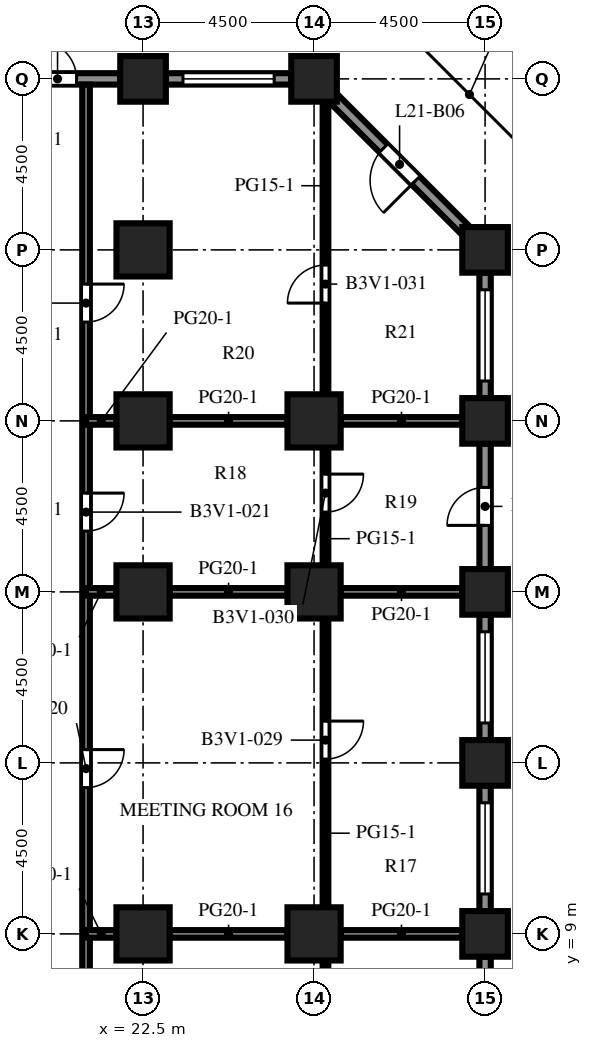
"""IFC4 building model, lengths in metres.
Left out: names, types, materials, properties, quantities, classifications, styles, units other than length and angle.
Written with IfcOpenShell. Run it as: python <this file> out.ifc"""

import sys

from ifc_helpers import new_model, si_unit, direction, frame, frame_2d, origin, origin_2d, place, context, subcontext, project, spatial, rectangle, extrude, element, fill, save


model = new_model("IFC4")
c1 = context("Model", 3, precision=1e-05, world=origin(), true_north=direction((0.0, 1.0)))
c2 = subcontext(c1, "Body", "Model", "MODEL_VIEW")
j1 = project(units=[si_unit("LENGTHUNIT", "METRE"), si_unit("PLANEANGLEUNIT", "RADIAN")], contexts=[c1])
p1 = place(None, origin())
s1 = spatial("IfcSite", under=j1, at=p1, CompositionType="ELEMENT")
p2 = place(p1, origin())
s2 = spatial("IfcBuilding", under=s1, at=p2, CompositionType="ELEMENT")
p3 = place(p2, frame((0.0, 0.0, 94.3)))
s3 = spatial("IfcBuildingStorey", under=s2, at=p3, CompositionType="ELEMENT", Elevation=94.3)
for number, where, z_axis, x_axis in (
    (1, (22.5, 31.5, 0.0), (0.0, 0.0, 1.0), (1.0, 0.0, 0.0)),
    (2, (27.0, 31.5, 0.0), (0.0, 0.0, 1.0), (1.0, 0.0, 0.0)),
    (3, (31.5, 9.0, 0.0), (0.0, 0.0, 1.0), (1.0, 0.0, 0.0)),
    (4, (31.5, 13.5, 0.0), (0.0, 0.0, 1.0), (1.0, 0.0, 0.0)),
    (5, (31.5, 18.0, 0.0), (0.0, 0.0, 1.0), (1.0, 0.0, 0.0)),
    (6, (31.5, 22.5, 0.0), (0.0, 0.0, 1.0), (1.0, 0.0, 0.0)),
    (7, (31.5, 27.0, 0.0), (0.0, 0.0, 1.0), (1.0, 0.0, 0.0)),
):
    element("IfcColumn", number, at=place(p3, frame(where, z_axis=z_axis, x_axis=x_axis)), inside=s3, PredefinedType="COLUMN", context=c2, shape_type="SweptSolid", body=[
        extrude(rectangle(XDim=1.2, YDim=1.2, at=origin_2d()), origin(), (0.0, 0.0, 1.0), 4.1),
    ])
for number, where, z_axis, x_axis in (
    (8, (22.5, 9.0, 0.0), (0.0, 0.0, 1.0), (1.0, 0.0, 0.0)),
    (9, (22.5, 18.0, 0.0), (0.0, 0.0, 1.0), (1.0, 0.0, 0.0)),
    (10, (22.5, 22.5, 0.0), (0.0, 0.0, 1.0), (1.0, 0.0, 0.0)),
    (11, (22.5, 27.0, 0.0), (0.0, 0.0, 1.0), (1.0, 0.0, 0.0)),
    (12, (27.0, 9.0, 0.0), (0.0, 0.0, 1.0), (1.0, 0.0, 0.0)),
    (13, (27.0, 18.0, 0.0), (0.0, 0.0, 1.0), (1.0, 0.0, 0.0)),
    (14, (27.0, 22.5, 0.0), (0.0, 0.0, 1.0), (1.0, 0.0, 0.0)),
):
    element("IfcColumn", number, at=place(p3, frame(where, z_axis=z_axis, x_axis=x_axis)), inside=s3, PredefinedType="COLUMN", context=c2, shape_type="SweptSolid", body=[
        extrude(rectangle(XDim=1.4, YDim=1.4, at=origin_2d()), origin(), (0.0, 0.0, 1.0), 4.1),
    ])
p4 = place(p3, frame((31.5, 8.4, 0.0), z_axis=(0.0, 0.0, 1.0), x_axis=(0.0, -1.0, 0.0)))
e15 = element("IfcWall", 15, at=p4, inside=s3, PredefinedType="SOLIDWALL", context=c2, shape_type="SweptSolid", body=[
    extrude(rectangle(XDim=3.3, YDim=0.3, at=frame_2d((1.65, 0.0))), origin(), (0.0, 0.0, 1.0), 2.75),
])
p5 = place(p4, frame((0.45, 0.0, 0.8)))
e16 = element("IfcOpeningElement", 16, at=p5, cuts=e15, PredefinedType="OPENING", context=c2, shape_type="SweptSolid", body=[
    extrude(rectangle(XDim=2.4, YDim=1.7, at=frame_2d((1.2, 0.85))), frame((0.0, 0.16, 0.0), z_axis=(0.0, -1.0, 0.0), x_axis=(1.0, 0.0, 0.0)), (0.0, 0.0, 1.0), 0.32),
])
p6 = place(p3, frame((31.5, 12.9, 0.0), z_axis=(0.0, 0.0, 1.0), x_axis=(0.0, -1.0, 0.0)))
e17 = element("IfcWall", 17, at=p6, inside=s3, PredefinedType="SOLIDWALL", context=c2, shape_type="SweptSolid", body=[
    extrude(rectangle(XDim=3.3, YDim=0.3, at=frame_2d((1.65, 0.0))), origin(), (0.0, 0.0, 1.0), 2.75),
])
p7 = place(p6, frame((0.45, 0.0, 0.8)))
e18 = element("IfcOpeningElement", 18, at=p7, cuts=e17, PredefinedType="OPENING", context=c2, shape_type="SweptSolid", body=[
    extrude(rectangle(XDim=2.4, YDim=1.7, at=frame_2d((1.2, 0.85))), frame((0.0, 0.16, 0.0), z_axis=(0.0, -1.0, 0.0), x_axis=(1.0, 0.0, 0.0)), (0.0, 0.0, 1.0), 0.32),
])
p8 = place(p3, frame((31.5, 17.4, 0.0), z_axis=(0.0, 0.0, 1.0), x_axis=(0.0, -1.0, 0.0)))
e19 = element("IfcWall", 19, at=p8, inside=s3, PredefinedType="SOLIDWALL", context=c2, shape_type="SweptSolid", body=[
    extrude(rectangle(XDim=3.3, YDim=0.3, at=frame_2d((1.65, 0.0))), origin(), (0.0, 0.0, 1.0), 2.75),
])
p9 = place(p8, frame((0.45, 0.0, 0.8)))
e20 = element("IfcOpeningElement", 20, at=p9, cuts=e19, PredefinedType="OPENING", context=c2, shape_type="SweptSolid", body=[
    extrude(rectangle(XDim=2.4, YDim=1.7, at=frame_2d((1.2, 0.85))), frame((0.0, 0.16, 0.0), z_axis=(0.0, -1.0, 0.0), x_axis=(1.0, 0.0, 0.0)), (0.0, 0.0, 1.0), 0.32),
])
p10 = place(p3, frame((31.5, 21.9, 0.0), z_axis=(0.0, 0.0, 1.0), x_axis=(0.0, -1.0, 0.0)))
e21 = element("IfcWall", 21, at=p10, inside=s3, PredefinedType="SOLIDWALL", context=c2, shape_type="SweptSolid", body=[
    extrude(rectangle(XDim=3.3, YDim=0.3, at=frame_2d((1.65, 0.0))), origin(), (0.0, 0.0, 1.0), 2.75),
])
p11 = place(p10, frame((1.15, 0.0, 0.0)))
e22 = element("IfcOpeningElement", 22, at=p11, cuts=e21, PredefinedType="OPENING", context=c2, shape_type="SweptSolid", body=[
    extrude(rectangle(XDim=1.0, YDim=2.2, at=frame_2d((0.5, 1.1))), frame((0.0, 0.16, 0.0), z_axis=(0.0, -1.0, 0.0), x_axis=(1.0, 0.0, 0.0)), (0.0, 0.0, 1.0), 0.32),
])
p12 = place(p3, frame((31.5, 26.4, 0.0), z_axis=(0.0, 0.0, 1.0), x_axis=(0.0, -1.0, 0.0)))
e23 = element("IfcWall", 23, at=p12, inside=s3, PredefinedType="SOLIDWALL", context=c2, shape_type="SweptSolid", body=[
    extrude(rectangle(XDim=3.3, YDim=0.3, at=frame_2d((1.65, 0.0))), origin(), (0.0, 0.0, 1.0), 2.75),
])
p13 = place(p12, frame((0.45, 0.0, 0.8)))
e24 = element("IfcOpeningElement", 24, at=p13, cuts=e23, PredefinedType="OPENING", context=c2, shape_type="SweptSolid", body=[
    extrude(rectangle(XDim=2.4, YDim=1.7, at=frame_2d((1.2, 0.85))), frame((0.0, 0.16, 0.0), z_axis=(0.0, -1.0, 0.0), x_axis=(1.0, 0.0, 0.0)), (0.0, 0.0, 1.0), 0.32),
])
p14 = place(p3, frame((27.494, 31.006, 0.0), z_axis=(0.0, 0.0, 1.0), x_axis=(0.707106781187, -0.707106781187, 0.0)))
e25 = element("IfcWall", 25, at=p14, inside=s3, PredefinedType="SOLIDWALL", context=c2, shape_type="SweptSolid", body=[
    extrude(rectangle(XDim=4.967, YDim=0.3, at=frame_2d((2.483, 0.0))), origin(), (0.0, 0.0, 1.0), 2.75),
])
p15 = place(p14, frame((1.884, 0.0, 0.0)))
e26 = element("IfcOpeningElement", 26, at=p15, cuts=e25, PredefinedType="OPENING", context=c2, shape_type="SweptSolid", body=[
    extrude(rectangle(XDim=1.2, YDim=2.2, at=frame_2d((0.6, 1.1))), frame((0.0, 0.16, 0.0), z_axis=(0.0, -1.0, 0.0), x_axis=(1.0, 0.0, 0.0)), (0.0, 0.0, 1.0), 0.32),
])
p16 = place(p3, frame((23.1, 31.5, 0.0), z_axis=(0.0, 0.0, 1.0), x_axis=(1.0, 0.0, 0.0)))
e27 = element("IfcWall", 27, at=p16, inside=s3, PredefinedType="SOLIDWALL", context=c2, shape_type="SweptSolid", body=[
    extrude(rectangle(XDim=3.3, YDim=0.3, at=frame_2d((1.65, 0.0))), origin(), (0.0, 0.0, 1.0), 2.75),
])
p17 = place(p16, frame((0.45, 0.0, 0.8)))
e28 = element("IfcOpeningElement", 28, at=p17, cuts=e27, PredefinedType="OPENING", context=c2, shape_type="SweptSolid", body=[
    extrude(rectangle(XDim=2.4, YDim=1.7, at=frame_2d((1.2, 0.85))), frame((0.0, 0.16, 0.0), z_axis=(0.0, -1.0, 0.0), x_axis=(1.0, 0.0, 0.0)), (0.0, 0.0, 1.0), 0.32),
])
p18 = place(p3, frame((18.6, 31.5, 0.0), z_axis=(0.0, 0.0, 1.0), x_axis=(1.0, 0.0, 0.0)))
e29 = element("IfcWall", 29, at=p18, inside=s3, PredefinedType="SOLIDWALL", context=c2, shape_type="SweptSolid", body=[
    extrude(rectangle(XDim=3.3, YDim=0.3, at=frame_2d((1.65, 0.0))), origin(), (0.0, 0.0, 1.0), 2.75),
])
p19 = place(p18, frame((1.15, 0.0, 0.0)))
e30 = element("IfcOpeningElement", 30, at=p19, cuts=e29, PredefinedType="OPENING", context=c2, shape_type="SweptSolid", body=[
    extrude(rectangle(XDim=1.0, YDim=2.2, at=frame_2d((0.5, 1.1))), frame((0.0, 0.16, 0.0), z_axis=(0.0, -1.0, 0.0), x_axis=(1.0, 0.0, 0.0)), (0.0, 0.0, 1.0), 0.32),
])
p20 = place(p3, frame((21.0, 31.35, 0.0), z_axis=(0.0, 0.0, 1.0), x_axis=(0.0, -1.0, 0.0)))
e31 = element("IfcWall", 31, at=p20, inside=s3, PredefinedType="PARTITIONING", context=c2, shape_type="SweptSolid", body=[
    extrude(rectangle(XDim=53.7, YDim=0.2, at=frame_2d((26.85, 0.0))), origin(), (0.0, 0.0, 1.0), 3.65),
])
p21 = place(p20, frame((47.5, 0.0, 0.0)))
e32 = element("IfcOpeningElement", 32, at=p21, cuts=e31, PredefinedType="OPENING", context=c2, shape_type="SweptSolid", body=[
    extrude(rectangle(XDim=1.0, YDim=2.1, at=frame_2d((0.5, 1.05))), frame((0.0, 0.11, 0.0), z_axis=(0.0, -1.0, 0.0), x_axis=(1.0, 0.0, 0.0)), (0.0, 0.0, 1.0), 0.22),
])
p22 = place(p20, frame((37.5, 0.0, 0.0)))
e33 = element("IfcOpeningElement", 33, at=p22, cuts=e31, PredefinedType="OPENING", context=c2, shape_type="SweptSolid", body=[
    extrude(rectangle(XDim=1.0, YDim=2.1, at=frame_2d((0.5, 1.05))), frame((0.0, 0.11, 0.0), z_axis=(0.0, -1.0, 0.0), x_axis=(1.0, 0.0, 0.0)), (0.0, 0.0, 1.0), 0.22),
])
p23 = place(p20, frame((27.25, 0.0, 0.0)))
e34 = element("IfcOpeningElement", 34, at=p23, cuts=e31, PredefinedType="OPENING", context=c2, shape_type="SweptSolid", body=[
    extrude(rectangle(XDim=1.0, YDim=2.1, at=frame_2d((0.5, 1.05))), frame((0.0, 0.11, 0.0), z_axis=(0.0, -1.0, 0.0), x_axis=(1.0, 0.0, 0.0)), (0.0, 0.0, 1.0), 0.22),
])
p24 = place(p20, frame((17.5, 0.0, 0.0)))
e35 = element("IfcOpeningElement", 35, at=p24, cuts=e31, PredefinedType="OPENING", context=c2, shape_type="SweptSolid", body=[
    extrude(rectangle(XDim=1.0, YDim=2.1, at=frame_2d((0.5, 1.05))), frame((0.0, 0.11, 0.0), z_axis=(0.0, -1.0, 0.0), x_axis=(1.0, 0.0, 0.0)), (0.0, 0.0, 1.0), 0.22),
])
p25 = place(p20, frame((10.75, 0.0, 0.0)))
e36 = element("IfcOpeningElement", 36, at=p25, cuts=e31, PredefinedType="OPENING", context=c2, shape_type="SweptSolid", body=[
    extrude(rectangle(XDim=1.0, YDim=2.1, at=frame_2d((0.5, 1.05))), frame((0.0, 0.11, 0.0), z_axis=(0.0, -1.0, 0.0), x_axis=(1.0, 0.0, 0.0)), (0.0, 0.0, 1.0), 0.22),
])
p26 = place(p20, frame((5.25, 0.0, 0.0)))
e37 = element("IfcOpeningElement", 37, at=p26, cuts=e31, PredefinedType="OPENING", context=c2, shape_type="SweptSolid", body=[
    extrude(rectangle(XDim=1.0, YDim=2.1, at=frame_2d((0.5, 1.05))), frame((0.0, 0.11, 0.0), z_axis=(0.0, -1.0, 0.0), x_axis=(1.0, 0.0, 0.0)), (0.0, 0.0, 1.0), 0.22),
])
p27 = place(p3, frame((27.3, 8.3, 0.0), z_axis=(0.0, 0.0, 1.0), x_axis=(0.0, -1.0, 0.0)))
e38 = element("IfcWall", 38, at=p27, inside=s3, PredefinedType="PARTITIONING", context=c2, shape_type="SweptSolid", body=[
    extrude(rectangle(XDim=7.6, YDim=0.15, at=frame_2d((3.8, 0.0))), origin(), (0.0, 0.0, 1.0), 3.65),
])
p28 = place(p27, frame((2.7, 0.0, 0.0)))
e39 = element("IfcOpeningElement", 39, at=p28, cuts=e38, PredefinedType="OPENING", context=c2, shape_type="SweptSolid", body=[
    extrude(rectangle(XDim=1.0, YDim=2.1, at=frame_2d((0.5, 1.05))), frame((0.0, 0.085, 0.0), z_axis=(0.0, -1.0, 0.0), x_axis=(1.0, 0.0, 0.0)), (0.0, 0.0, 1.0), 0.17),
])
p29 = place(p3, frame((27.3, 17.3, 0.0), z_axis=(0.0, 0.0, 1.0), x_axis=(0.0, -1.0, 0.0)))
e40 = element("IfcWall", 40, at=p29, inside=s3, PredefinedType="PARTITIONING", context=c2, shape_type="SweptSolid", body=[
    extrude(rectangle(XDim=7.6, YDim=0.15, at=frame_2d((3.8, 0.0))), origin(), (0.0, 0.0, 1.0), 3.65),
])
p30 = place(p29, frame((2.7, 0.0, 0.0)))
e41 = element("IfcOpeningElement", 41, at=p30, cuts=e40, PredefinedType="OPENING", context=c2, shape_type="SweptSolid", body=[
    extrude(rectangle(XDim=1.0, YDim=2.1, at=frame_2d((0.5, 1.05))), frame((0.0, 0.085, 0.0), z_axis=(0.0, -1.0, 0.0), x_axis=(1.0, 0.0, 0.0)), (0.0, 0.0, 1.0), 0.17),
])
p31 = place(p3, frame((27.3, 21.8, 0.0), z_axis=(0.0, 0.0, 1.0), x_axis=(0.0, -1.0, 0.0)))
e42 = element("IfcWall", 42, at=p31, inside=s3, PredefinedType="PARTITIONING", context=c2, shape_type="SweptSolid", body=[
    extrude(rectangle(XDim=3.1, YDim=0.15, at=frame_2d((1.55, 0.0))), origin(), (0.0, 0.0, 1.0), 3.65),
])
p32 = place(p31, frame((0.7, 0.0, 0.0)))
e43 = element("IfcOpeningElement", 43, at=p32, cuts=e42, PredefinedType="OPENING", context=c2, shape_type="SweptSolid", body=[
    extrude(rectangle(XDim=1.0, YDim=2.1, at=frame_2d((0.5, 1.05))), frame((0.0, 0.085, 0.0), z_axis=(0.0, -1.0, 0.0), x_axis=(1.0, 0.0, 0.0)), (0.0, 0.0, 1.0), 0.17),
])
p33 = place(p3, frame((27.3, 30.777, 0.0), z_axis=(0.0, 0.0, 1.0), x_axis=(0.0, -1.0, 0.0)))
e44 = element("IfcWall", 44, at=p33, inside=s3, PredefinedType="PARTITIONING", context=c2, shape_type="SweptSolid", body=[
    extrude(rectangle(XDim=7.577, YDim=0.15, at=frame_2d((3.789, 0.0))), origin(), (0.0, 0.0, 1.0), 3.65),
])
p34 = place(p33, frame((4.177, 0.0, 0.0)))
e45 = element("IfcOpeningElement", 45, at=p34, cuts=e44, PredefinedType="OPENING", context=c2, shape_type="SweptSolid", body=[
    extrude(rectangle(XDim=1.0, YDim=2.1, at=frame_2d((0.5, 1.05))), frame((0.0, 0.085, 0.0), z_axis=(0.0, -1.0, 0.0), x_axis=(1.0, 0.0, 0.0)), (0.0, 0.0, 1.0), 0.17),
])
p35 = place(p3, frame((21.0, 9.0, 0.0), z_axis=(0.0, 0.0, 1.0), x_axis=(1.0, 0.0, 0.0)))
e46 = element("IfcWall", 46, at=p35, inside=s3, PredefinedType="PARTITIONING", context=c2, shape_type="SweptSolid", body=[
    extrude(rectangle(XDim=0.8, YDim=0.2, at=frame_2d((0.4, 0.0))), origin(), (0.0, 0.0, 1.0), 3.65),
])
p36 = place(p3, frame((23.2, 9.0, 0.0), z_axis=(0.0, 0.0, 1.0), x_axis=(1.0, 0.0, 0.0)))
e47 = element("IfcWall", 47, at=p36, inside=s3, PredefinedType="PARTITIONING", context=c2, shape_type="SweptSolid", body=[
    extrude(rectangle(XDim=3.1, YDim=0.2, at=frame_2d((1.55, 0.0))), origin(), (0.0, 0.0, 1.0), 3.65),
])
p37 = place(p3, frame((27.7, 9.0, 0.0), z_axis=(0.0, 0.0, 1.0), x_axis=(1.0, 0.0, 0.0)))
e48 = element("IfcWall", 48, at=p37, inside=s3, PredefinedType="PARTITIONING", context=c2, shape_type="SweptSolid", body=[
    extrude(rectangle(XDim=3.2, YDim=0.2, at=frame_2d((1.6, 0.0))), origin(), (0.0, 0.0, 1.0), 3.65),
])
p38 = place(p3, frame((21.0, 18.0, 0.0), z_axis=(0.0, 0.0, 1.0), x_axis=(1.0, 0.0, 0.0)))
e49 = element("IfcWall", 49, at=p38, inside=s3, PredefinedType="PARTITIONING", context=c2, shape_type="SweptSolid", body=[
    extrude(rectangle(XDim=0.8, YDim=0.2, at=frame_2d((0.4, 0.0))), origin(), (0.0, 0.0, 1.0), 3.65),
])
p39 = place(p3, frame((23.2, 18.0, 0.0), z_axis=(0.0, 0.0, 1.0), x_axis=(1.0, 0.0, 0.0)))
e50 = element("IfcWall", 50, at=p39, inside=s3, PredefinedType="PARTITIONING", context=c2, shape_type="SweptSolid", body=[
    extrude(rectangle(XDim=3.1, YDim=0.2, at=frame_2d((1.55, 0.0))), origin(), (0.0, 0.0, 1.0), 3.65),
])
p40 = place(p3, frame((27.7, 18.0, 0.0), z_axis=(0.0, 0.0, 1.0), x_axis=(1.0, 0.0, 0.0)))
e51 = element("IfcWall", 51, at=p40, inside=s3, PredefinedType="PARTITIONING", context=c2, shape_type="SweptSolid", body=[
    extrude(rectangle(XDim=3.2, YDim=0.2, at=frame_2d((1.6, 0.0))), origin(), (0.0, 0.0, 1.0), 3.65),
])
p41 = place(p3, frame((21.0, 22.5, 0.0), z_axis=(0.0, 0.0, 1.0), x_axis=(1.0, 0.0, 0.0)))
e52 = element("IfcWall", 52, at=p41, inside=s3, PredefinedType="PARTITIONING", context=c2, shape_type="SweptSolid", body=[
    extrude(rectangle(XDim=0.8, YDim=0.2, at=frame_2d((0.4, 0.0))), origin(), (0.0, 0.0, 1.0), 3.65),
])
p42 = place(p3, frame((23.2, 22.5, 0.0), z_axis=(0.0, 0.0, 1.0), x_axis=(1.0, 0.0, 0.0)))
e53 = element("IfcWall", 53, at=p42, inside=s3, PredefinedType="PARTITIONING", context=c2, shape_type="SweptSolid", body=[
    extrude(rectangle(XDim=3.1, YDim=0.2, at=frame_2d((1.55, 0.0))), origin(), (0.0, 0.0, 1.0), 3.65),
])
p43 = place(p3, frame((27.7, 22.5, 0.0), z_axis=(0.0, 0.0, 1.0), x_axis=(1.0, 0.0, 0.0)))
e54 = element("IfcWall", 54, at=p43, inside=s3, PredefinedType="PARTITIONING", context=c2, shape_type="SweptSolid", body=[
    extrude(rectangle(XDim=3.2, YDim=0.2, at=frame_2d((1.6, 0.0))), origin(), (0.0, 0.0, 1.0), 3.65),
])
p44 = place(p7, origin())
e55 = element("IfcWindow", 55, at=p44, inside=s3, PartitioningType="SINGLE_PANEL", PredefinedType="WINDOW", context=c2, shape_type="SweptSolid", body=[
    extrude(rectangle(XDim=2.4, YDim=1.7, at=frame_2d((1.2, 0.85))), frame((0.0, 0.03, 0.0), z_axis=(0.0, -1.0, 0.0), x_axis=(1.0, 0.0, 0.0)), (0.0, 0.0, 1.0), 0.06),
])
fill(e18, e55)
p45 = place(p9, origin())
e56 = element("IfcWindow", 56, at=p45, inside=s3, PartitioningType="SINGLE_PANEL", PredefinedType="WINDOW", context=c2, shape_type="SweptSolid", body=[
    extrude(rectangle(XDim=2.4, YDim=1.7, at=frame_2d((1.2, 0.85))), frame((0.0, 0.03, 0.0), z_axis=(0.0, -1.0, 0.0), x_axis=(1.0, 0.0, 0.0)), (0.0, 0.0, 1.0), 0.06),
])
fill(e20, e56)
p46 = place(p11, origin())
e57 = element("IfcDoor", 57, at=p46, inside=s3, OperationType="SINGLE_SWING_RIGHT", PredefinedType="DOOR", context=c2, shape_type="SweptSolid", body=[
    extrude(rectangle(XDim=1.0, YDim=2.2, at=frame_2d((0.5, 1.1))), frame((0.0, 0.025, 0.0), z_axis=(0.0, -1.0, 0.0), x_axis=(1.0, 0.0, 0.0)), (0.0, 0.0, 1.0), 0.05),
])
fill(e22, e57)
p47 = place(p13, origin())
e58 = element("IfcWindow", 58, at=p47, inside=s3, PartitioningType="SINGLE_PANEL", PredefinedType="WINDOW", context=c2, shape_type="SweptSolid", body=[
    extrude(rectangle(XDim=2.4, YDim=1.7, at=frame_2d((1.2, 0.85))), frame((0.0, 0.03, 0.0), z_axis=(0.0, -1.0, 0.0), x_axis=(1.0, 0.0, 0.0)), (0.0, 0.0, 1.0), 0.06),
])
fill(e24, e58)
p48 = place(p15, origin())
e59 = element("IfcDoor", 59, at=p48, inside=s3, OperationType="SINGLE_SWING_RIGHT", PredefinedType="DOOR", context=c2, shape_type="SweptSolid", body=[
    extrude(rectangle(XDim=1.2, YDim=2.2, at=frame_2d((0.6, 1.1))), frame((0.0, 0.025, 0.0), z_axis=(0.0, -1.0, 0.0), x_axis=(1.0, 0.0, 0.0)), (0.0, 0.0, 1.0), 0.05),
])
fill(e26, e59)
p49 = place(p17, origin())
e60 = element("IfcWindow", 60, at=p49, inside=s3, PartitioningType="SINGLE_PANEL", PredefinedType="WINDOW", context=c2, shape_type="SweptSolid", body=[
    extrude(rectangle(XDim=2.4, YDim=1.7, at=frame_2d((1.2, 0.85))), frame((0.0, 0.03, 0.0), z_axis=(0.0, -1.0, 0.0), x_axis=(1.0, 0.0, 0.0)), (0.0, 0.0, 1.0), 0.06),
])
fill(e28, e60)
p50 = place(p19, origin())
e61 = element("IfcDoor", 61, at=p50, inside=s3, OperationType="SINGLE_SWING_LEFT", PredefinedType="DOOR", context=c2, shape_type="SweptSolid", body=[
    extrude(rectangle(XDim=1.0, YDim=2.2, at=frame_2d((0.5, 1.1))), frame((0.0, 0.025, 0.0), z_axis=(0.0, -1.0, 0.0), x_axis=(1.0, 0.0, 0.0)), (0.0, 0.0, 1.0), 0.05),
])
fill(e30, e61)
p51 = place(p24, origin())
e62 = element("IfcDoor", 62, at=p51, inside=s3, OperationType="SINGLE_SWING_LEFT", PredefinedType="DOOR", context=c2, shape_type="SweptSolid", body=[
    extrude(rectangle(XDim=1.0, YDim=2.1, at=frame_2d((0.5, 1.05))), frame((0.0, 0.025, 0.0), z_axis=(0.0, -1.0, 0.0), x_axis=(1.0, 0.0, 0.0)), (0.0, 0.0, 1.0), 0.05),
])
fill(e35, e62)
p52 = place(p25, origin())
e63 = element("IfcDoor", 63, at=p52, inside=s3, OperationType="SINGLE_SWING_LEFT", PredefinedType="DOOR", context=c2, shape_type="SweptSolid", body=[
    extrude(rectangle(XDim=1.0, YDim=2.1, at=frame_2d((0.5, 1.05))), frame((0.0, 0.025, 0.0), z_axis=(0.0, -1.0, 0.0), x_axis=(1.0, 0.0, 0.0)), (0.0, 0.0, 1.0), 0.05),
])
fill(e36, e63)
p53 = place(p26, origin())
e64 = element("IfcDoor", 64, at=p53, inside=s3, OperationType="SINGLE_SWING_LEFT", PredefinedType="DOOR", context=c2, shape_type="SweptSolid", body=[
    extrude(rectangle(XDim=1.0, YDim=2.1, at=frame_2d((0.5, 1.05))), frame((0.0, 0.025, 0.0), z_axis=(0.0, -1.0, 0.0), x_axis=(1.0, 0.0, 0.0)), (0.0, 0.0, 1.0), 0.05),
])
fill(e37, e64)
p54 = place(p30, origin())
e65 = element("IfcDoor", 65, at=p54, inside=s3, OperationType="SINGLE_SWING_LEFT", PredefinedType="DOOR", context=c2, shape_type="SweptSolid", body=[
    extrude(rectangle(XDim=1.0, YDim=2.1, at=frame_2d((0.5, 1.05))), frame((0.0, 0.025, 0.0), z_axis=(0.0, -1.0, 0.0), x_axis=(1.0, 0.0, 0.0)), (0.0, 0.0, 1.0), 0.05),
])
fill(e41, e65)
p55 = place(p32, origin())
e66 = element("IfcDoor", 66, at=p55, inside=s3, OperationType="SINGLE_SWING_LEFT", PredefinedType="DOOR", context=c2, shape_type="SweptSolid", body=[
    extrude(rectangle(XDim=1.0, YDim=2.1, at=frame_2d((0.5, 1.05))), frame((0.0, 0.025, 0.0), z_axis=(0.0, -1.0, 0.0), x_axis=(1.0, 0.0, 0.0)), (0.0, 0.0, 1.0), 0.05),
])
fill(e43, e66)
p56 = place(p34, origin())
e67 = element("IfcDoor", 67, at=p56, inside=s3, OperationType="SINGLE_SWING_RIGHT", PredefinedType="DOOR", context=c2, shape_type="SweptSolid", body=[
    extrude(rectangle(XDim=1.0, YDim=2.1, at=frame_2d((0.5, 1.05))), frame((0.0, 0.025, 0.0), z_axis=(0.0, -1.0, 0.0), x_axis=(1.0, 0.0, 0.0)), (0.0, 0.0, 1.0), 0.05),
])
fill(e45, e67)
save(model, sys.argv[1])
